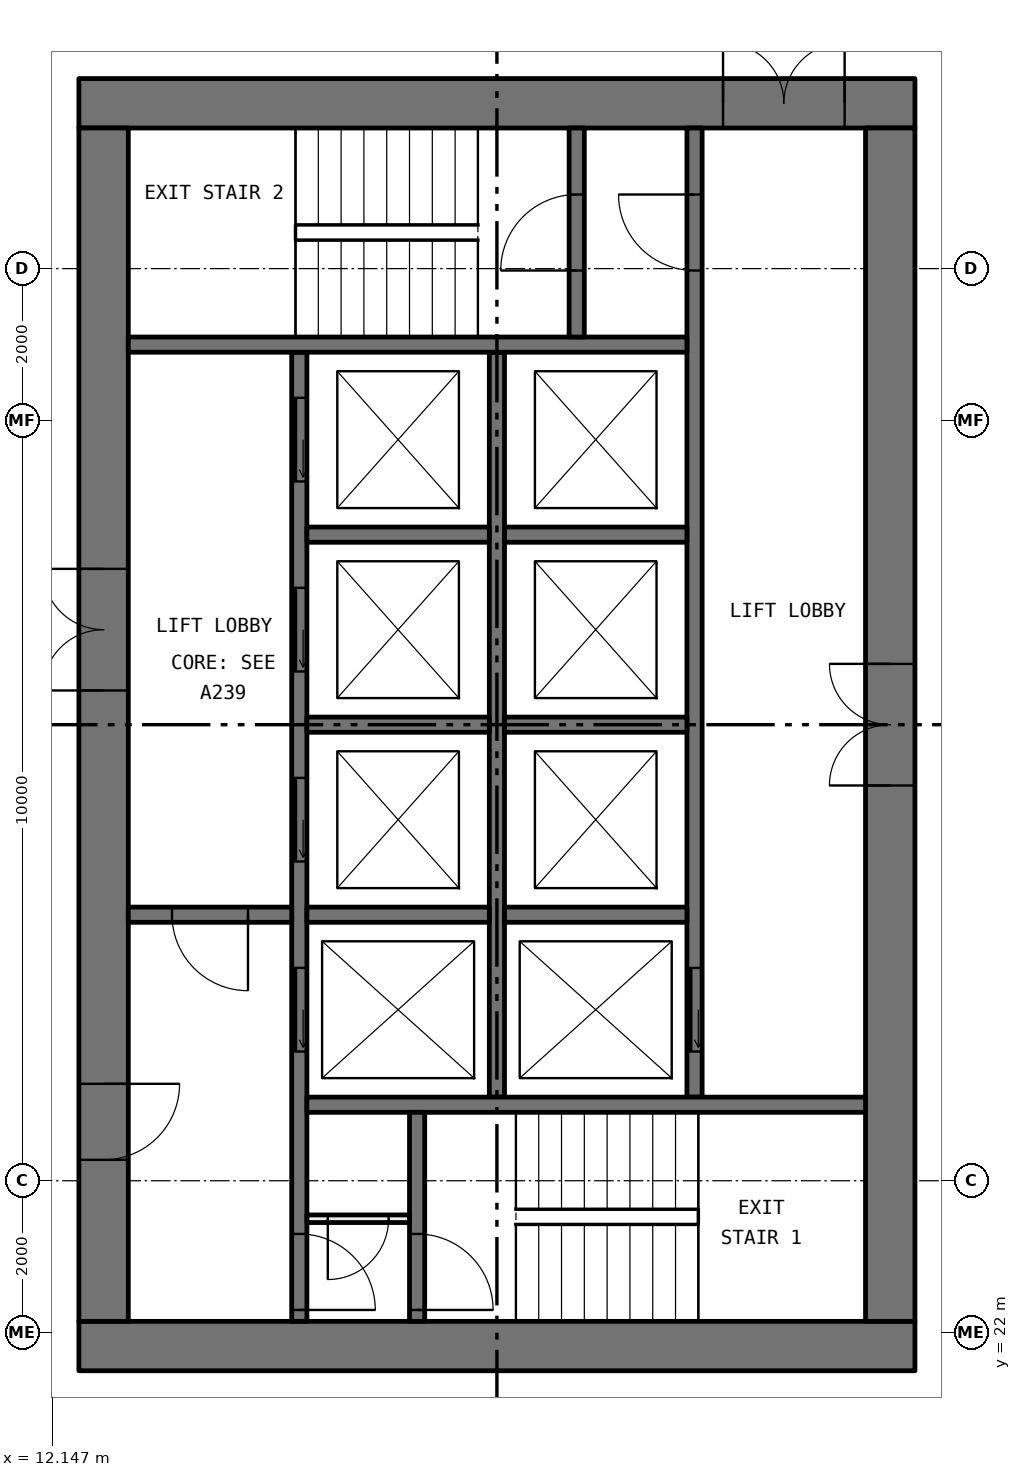
"""IFC4 building model, lengths in metres.
Left out: names, types, materials, properties, quantities, classifications, styles, units other than length and angle.
Written with IfcOpenShell. Run it as: python <this file> out.ifc"""

import sys

from ifc_helpers import new_model, si_unit, direction, frame, frame_2d, origin, place, context, subcontext, project, spatial, rectangle, extrude, element, fill, save


model = new_model("IFC4")
c1 = context("Model", 3, precision=1e-05, world=origin(), true_north=direction((0.0, 1.0)))
c2 = subcontext(c1, "Body", "Model", "MODEL_VIEW")
j1 = project(units=[si_unit("LENGTHUNIT", "METRE"), si_unit("PLANEANGLEUNIT", "RADIAN")], contexts=[c1])
p1 = place(None, origin())
s1 = spatial("IfcSite", under=j1, at=p1, CompositionType="ELEMENT")
p2 = place(p1, origin())
s2 = spatial("IfcBuilding", under=s1, at=p2, CompositionType="ELEMENT")
p3 = place(p2, frame((0.0, 0.0, 144.9)))
s3 = spatial("IfcBuildingStorey", under=s2, at=p3, CompositionType="ELEMENT", Elevation=144.9)
p4 = place(p3, frame((12.5, 21.825, 0.0), z_axis=(0.0, 0.0, 1.0), x_axis=(1.0, 0.0, 0.0)))
e1 = element("IfcWall", 1, at=p4, inside=s3, PredefinedType="SHEAR", context=c2, shape_type="SweptSolid", body=[
    extrude(rectangle(XDim=11.0, YDim=0.65, at=frame_2d((5.5, 0.0))), origin(), (0.0, 0.0, 1.0), 3.05),
])
p5 = place(p3, frame((12.5, 38.175, 0.0), z_axis=(0.0, 0.0, 1.0), x_axis=(1.0, 0.0, 0.0)))
e2 = element("IfcWall", 2, at=p5, inside=s3, PredefinedType="SHEAR", context=c2, shape_type="SweptSolid", body=[
    extrude(rectangle(XDim=11.0, YDim=0.65, at=frame_2d((5.5, 0.0))), origin(), (0.0, 0.0, 1.0), 3.05),
])
p6 = place(p5, frame((8.475, 0.0, 0.0)))
e3 = element("IfcOpeningElement", 3, at=p6, cuts=e2, PredefinedType="OPENING", context=c2, shape_type="SweptSolid", body=[
    extrude(rectangle(XDim=1.6, YDim=2.1, at=frame_2d((0.8, 1.05))), frame((0.0, 0.335, 0.0), z_axis=(0.0, -1.0, 0.0), x_axis=(1.0, 0.0, 0.0)), (0.0, 0.0, 1.0), 0.67),
])
p7 = place(p3, frame((12.825, 22.15, 0.0), z_axis=(0.0, 0.0, 1.0), x_axis=(0.0, 1.0, 0.0)))
e4 = element("IfcWall", 4, at=p7, inside=s3, PredefinedType="SHEAR", context=c2, shape_type="SweptSolid", body=[
    extrude(rectangle(XDim=15.7, YDim=0.65, at=frame_2d((7.85, 0.0))), origin(), (0.0, 0.0, 1.0), 3.05),
])
p8 = place(p7, frame((8.3, 0.0, 0.0)))
e5 = element("IfcOpeningElement", 5, at=p8, cuts=e4, PredefinedType="OPENING", context=c2, shape_type="SweptSolid", body=[
    extrude(rectangle(XDim=1.6, YDim=2.1, at=frame_2d((0.8, 1.05))), frame((0.0, 0.335, 0.0), z_axis=(0.0, -1.0, 0.0), x_axis=(1.0, 0.0, 0.0)), (0.0, 0.0, 1.0), 0.67),
])
p9 = place(p7, frame((2.125, 0.0, 0.0)))
e6 = element("IfcOpeningElement", 6, at=p9, cuts=e4, PredefinedType="OPENING", context=c2, shape_type="SweptSolid", body=[
    extrude(rectangle(XDim=1.0, YDim=2.1, at=frame_2d((0.5, 1.05))), frame((0.0, 0.335, 0.0), z_axis=(0.0, -1.0, 0.0), x_axis=(1.0, 0.0, 0.0)), (0.0, 0.0, 1.0), 0.67),
])
p10 = place(p3, frame((23.175, 22.15, 0.0), z_axis=(0.0, 0.0, 1.0), x_axis=(0.0, 1.0, 0.0)))
e7 = element("IfcWall", 7, at=p10, inside=s3, PredefinedType="SHEAR", context=c2, shape_type="SweptSolid", body=[
    extrude(rectangle(XDim=15.7, YDim=0.65, at=frame_2d((7.85, 0.0))), origin(), (0.0, 0.0, 1.0), 3.05),
])
p11 = place(p10, frame((7.05, 0.0, 0.0)))
e8 = element("IfcOpeningElement", 8, at=p11, cuts=e7, PredefinedType="OPENING", context=c2, shape_type="SweptSolid", body=[
    extrude(rectangle(XDim=1.6, YDim=2.1, at=frame_2d((0.8, 1.05))), frame((0.0, 0.335, 0.0), z_axis=(0.0, -1.0, 0.0), x_axis=(1.0, 0.0, 0.0)), (0.0, 0.0, 1.0), 0.67),
])
p12 = place(p3, frame((15.4, 22.15, 0.0), z_axis=(0.0, 0.0, 1.0), x_axis=(0.0, 1.0, 0.0)))
e9 = element("IfcWall", 9, at=p12, inside=s3, PredefinedType="SOLIDWALL", context=c2, shape_type="SweptSolid", body=[
    extrude(rectangle(XDim=12.75, YDim=0.2, at=frame_2d((6.375, 0.0))), origin(), (0.0, 0.0, 1.0), 3.05),
])
p13 = place(p12, frame((3.55, 0.0, 0.0)))
e10 = element("IfcOpeningElement", 10, at=p13, cuts=e9, PredefinedType="OPENING", context=c2, shape_type="SweptSolid", body=[
    extrude(rectangle(XDim=1.1, YDim=2.1, at=frame_2d((0.55, 1.05))), frame((0.0, 0.11, 0.0), z_axis=(0.0, -1.0, 0.0), x_axis=(1.0, 0.0, 0.0)), (0.0, 0.0, 1.0), 0.22),
])
p14 = place(p12, frame((6.05, 0.0, 0.0)))
e11 = element("IfcOpeningElement", 11, at=p14, cuts=e9, PredefinedType="OPENING", context=c2, shape_type="SweptSolid", body=[
    extrude(rectangle(XDim=1.1, YDim=2.1, at=frame_2d((0.55, 1.05))), frame((0.0, 0.11, 0.0), z_axis=(0.0, -1.0, 0.0), x_axis=(1.0, 0.0, 0.0)), (0.0, 0.0, 1.0), 0.22),
])
p15 = place(p12, frame((8.55, 0.0, 0.0)))
e12 = element("IfcOpeningElement", 12, at=p15, cuts=e9, PredefinedType="OPENING", context=c2, shape_type="SweptSolid", body=[
    extrude(rectangle(XDim=1.1, YDim=2.1, at=frame_2d((0.55, 1.05))), frame((0.0, 0.11, 0.0), z_axis=(0.0, -1.0, 0.0), x_axis=(1.0, 0.0, 0.0)), (0.0, 0.0, 1.0), 0.22),
])
p16 = place(p12, frame((11.05, 0.0, 0.0)))
e13 = element("IfcOpeningElement", 13, at=p16, cuts=e9, PredefinedType="OPENING", context=c2, shape_type="SweptSolid", body=[
    extrude(rectangle(XDim=1.1, YDim=2.1, at=frame_2d((0.55, 1.05))), frame((0.0, 0.11, 0.0), z_axis=(0.0, -1.0, 0.0), x_axis=(1.0, 0.0, 0.0)), (0.0, 0.0, 1.0), 0.22),
])
p17 = place(p12, frame((0.15, 0.0, 0.0)))
e14 = element("IfcOpeningElement", 14, at=p17, cuts=e9, PredefinedType="OPENING", context=c2, shape_type="SweptSolid", body=[
    extrude(rectangle(XDim=1.0, YDim=2.1, at=frame_2d((0.5, 1.05))), frame((0.0, 0.11, 0.0), z_axis=(0.0, -1.0, 0.0), x_axis=(1.0, 0.0, 0.0)), (0.0, 0.0, 1.0), 0.22),
])
p18 = place(p3, frame((20.6, 25.1, 0.0), z_axis=(0.0, 0.0, 1.0), x_axis=(0.0, 1.0, 0.0)))
e15 = element("IfcWall", 15, at=p18, inside=s3, PredefinedType="SOLIDWALL", context=c2, shape_type="SweptSolid", body=[
    extrude(rectangle(XDim=12.75, YDim=0.2, at=frame_2d((6.375, 0.0))), origin(), (0.0, 0.0, 1.0), 3.05),
])
p19 = place(p18, frame((0.6, 0.0, 0.0)))
e16 = element("IfcOpeningElement", 16, at=p19, cuts=e15, PredefinedType="OPENING", context=c2, shape_type="SweptSolid", body=[
    extrude(rectangle(XDim=1.1, YDim=2.1, at=frame_2d((0.55, 1.05))), frame((0.0, 0.11, 0.0), z_axis=(0.0, -1.0, 0.0), x_axis=(1.0, 0.0, 0.0)), (0.0, 0.0, 1.0), 0.22),
])
p20 = place(p18, frame((10.875, 0.0, 0.0)))
e17 = element("IfcOpeningElement", 17, at=p20, cuts=e15, PredefinedType="OPENING", context=c2, shape_type="SweptSolid", body=[
    extrude(rectangle(XDim=1.0, YDim=2.1, at=frame_2d((0.5, 1.05))), frame((0.0, 0.11, 0.0), z_axis=(0.0, -1.0, 0.0), x_axis=(1.0, 0.0, 0.0)), (0.0, 0.0, 1.0), 0.22),
])
p21 = place(p3, frame((18.0, 25.1, 0.0), z_axis=(0.0, 0.0, 1.0), x_axis=(0.0, 1.0, 0.0)))
e18 = element("IfcWall", 18, at=p21, inside=s3, PredefinedType="SOLIDWALL", context=c2, shape_type="SweptSolid", body=[
    extrude(rectangle(XDim=9.8, YDim=0.2, at=frame_2d((4.9, 0.0))), origin(), (0.0, 0.0, 1.0), 3.05),
])
for number, where, z_axis, x_axis in (
    (19, (15.5, 25.0, 0.0), (0.0, 0.0, 1.0), (1.0, 0.0, 0.0)),
    (20, (13.15, 35.0, 0.0), (0.0, 0.0, 1.0), (1.0, 0.0, 0.0)),
):
    element("IfcWall", number, at=place(p3, frame(where, z_axis=z_axis, x_axis=x_axis)), inside=s3, PredefinedType="SOLIDWALL", context=c2, shape_type="SweptSolid", body=[
        extrude(rectangle(XDim=7.35, YDim=0.2, at=frame_2d((3.675, 0.0))), origin(), (0.0, 0.0, 1.0), 3.05),
    ])
p22 = place(p3, frame((13.15, 27.5, 0.0), z_axis=(0.0, 0.0, 1.0), x_axis=(1.0, 0.0, 0.0)))
e21 = element("IfcWall", 21, at=p22, inside=s3, PredefinedType="SOLIDWALL", context=c2, shape_type="SweptSolid", body=[
    extrude(rectangle(XDim=2.15, YDim=0.2, at=frame_2d((1.075, 0.0))), origin(), (0.0, 0.0, 1.0), 3.05),
])
p23 = place(p22, frame((0.575, 0.0, 0.0)))
e22 = element("IfcOpeningElement", 22, at=p23, cuts=e21, PredefinedType="OPENING", context=c2, shape_type="SweptSolid", body=[
    extrude(rectangle(XDim=1.0, YDim=2.1, at=frame_2d((0.5, 1.05))), frame((0.0, 0.11, 0.0), z_axis=(0.0, -1.0, 0.0), x_axis=(1.0, 0.0, 0.0)), (0.0, 0.0, 1.0), 0.22),
])
p24 = place(p3, frame((16.95, 22.15, 0.0), z_axis=(0.0, 0.0, 1.0), x_axis=(0.0, 1.0, 0.0)))
e23 = element("IfcWall", 23, at=p24, inside=s3, PredefinedType="SOLIDWALL", context=c2, shape_type="SweptSolid", body=[
    extrude(rectangle(XDim=2.75, YDim=0.2, at=frame_2d((1.375, 0.0))), origin(), (0.0, 0.0, 1.0), 3.05),
])
p25 = place(p24, frame((0.15, 0.0, 0.0)))
e24 = element("IfcOpeningElement", 24, at=p25, cuts=e23, PredefinedType="OPENING", context=c2, shape_type="SweptSolid", body=[
    extrude(rectangle(XDim=1.0, YDim=2.1, at=frame_2d((0.5, 1.05))), frame((0.0, 0.11, 0.0), z_axis=(0.0, -1.0, 0.0), x_axis=(1.0, 0.0, 0.0)), (0.0, 0.0, 1.0), 0.22),
])
p26 = place(p3, frame((19.05, 35.1, 0.0), z_axis=(0.0, 0.0, 1.0), x_axis=(0.0, 1.0, 0.0)))
e25 = element("IfcWall", 25, at=p26, inside=s3, PredefinedType="SOLIDWALL", context=c2, shape_type="SweptSolid", body=[
    extrude(rectangle(XDim=2.75, YDim=0.2, at=frame_2d((1.375, 0.0))), origin(), (0.0, 0.0, 1.0), 3.05),
])
p27 = place(p26, frame((0.875, 0.0, 0.0)))
e26 = element("IfcOpeningElement", 26, at=p27, cuts=e25, PredefinedType="OPENING", context=c2, shape_type="SweptSolid", body=[
    extrude(rectangle(XDim=1.0, YDim=2.1, at=frame_2d((0.5, 1.05))), frame((0.0, 0.11, 0.0), z_axis=(0.0, -1.0, 0.0), x_axis=(1.0, 0.0, 0.0)), (0.0, 0.0, 1.0), 0.22),
])
for number, where, z_axis, x_axis in (
    (27, (15.5, 27.5, 0.0), (0.0, 0.0, 1.0), (1.0, 0.0, 0.0)),
    (28, (15.5, 30.0, 0.0), (0.0, 0.0, 1.0), (1.0, 0.0, 0.0)),
    (29, (15.5, 32.5, 0.0), (0.0, 0.0, 1.0), (1.0, 0.0, 0.0)),
    (30, (18.1, 27.5, 0.0), (0.0, 0.0, 1.0), (1.0, 0.0, 0.0)),
    (31, (18.1, 30.0, 0.0), (0.0, 0.0, 1.0), (1.0, 0.0, 0.0)),
    (32, (18.1, 32.5, 0.0), (0.0, 0.0, 1.0), (1.0, 0.0, 0.0)),
):
    element("IfcWall", number, at=place(p3, frame(where, z_axis=z_axis, x_axis=x_axis)), inside=s3, PredefinedType="SOLIDWALL", context=c2, shape_type="SweptSolid", body=[
        extrude(rectangle(XDim=2.4, YDim=0.2, at=frame_2d((1.2, 0.0))), origin(), (0.0, 0.0, 1.0), 3.05),
    ])
p28 = place(p3, frame((15.5, 23.5, 0.0), z_axis=(0.0, 0.0, 1.0), x_axis=(1.0, 0.0, 0.0)))
e33 = element("IfcWall", 33, at=p28, inside=s3, PredefinedType="PARTITIONING", context=c2, shape_type="SweptSolid", body=[
    extrude(rectangle(XDim=1.35, YDim=0.1, at=frame_2d((0.675, 0.0))), origin(), (0.0, 0.0, 1.0), 3.05),
])
p29 = place(p28, frame((0.275, 0.0, 0.0)))
e34 = element("IfcOpeningElement", 34, at=p29, cuts=e33, PredefinedType="OPENING", context=c2, shape_type="SweptSolid", body=[
    extrude(rectangle(XDim=0.8, YDim=2.1, at=frame_2d((0.4, 1.05))), frame((0.0, 0.06, 0.0), z_axis=(0.0, -1.0, 0.0), x_axis=(1.0, 0.0, 0.0)), (0.0, 0.0, 1.0), 0.12),
])
p30 = place(p19, origin())
e35 = element("IfcDoor", 35, at=p30, inside=s3, OperationType="SLIDING_TO_LEFT", PredefinedType="DOOR", context=c2, shape_type="SweptSolid", body=[
    extrude(rectangle(XDim=1.1, YDim=2.1, at=frame_2d((0.55, 1.05))), frame((0.0, 0.025, 0.0), z_axis=(0.0, -1.0, 0.0), x_axis=(1.0, 0.0, 0.0)), (0.0, 0.0, 1.0), 0.05),
])
fill(e16, e35)
p31 = place(p13, origin())
e36 = element("IfcDoor", 36, at=p31, inside=s3, OperationType="SLIDING_TO_LEFT", PredefinedType="DOOR", context=c2, shape_type="SweptSolid", body=[
    extrude(rectangle(XDim=1.1, YDim=2.1, at=frame_2d((0.55, 1.05))), frame((0.0, 0.025, 0.0), z_axis=(0.0, -1.0, 0.0), x_axis=(1.0, 0.0, 0.0)), (0.0, 0.0, 1.0), 0.05),
])
fill(e10, e36)
p32 = place(p14, origin())
e37 = element("IfcDoor", 37, at=p32, inside=s3, OperationType="SLIDING_TO_LEFT", PredefinedType="DOOR", context=c2, shape_type="SweptSolid", body=[
    extrude(rectangle(XDim=1.1, YDim=2.1, at=frame_2d((0.55, 1.05))), frame((0.0, 0.025, 0.0), z_axis=(0.0, -1.0, 0.0), x_axis=(1.0, 0.0, 0.0)), (0.0, 0.0, 1.0), 0.05),
])
fill(e11, e37)
p33 = place(p15, origin())
e38 = element("IfcDoor", 38, at=p33, inside=s3, OperationType="SLIDING_TO_LEFT", PredefinedType="DOOR", context=c2, shape_type="SweptSolid", body=[
    extrude(rectangle(XDim=1.1, YDim=2.1, at=frame_2d((0.55, 1.05))), frame((0.0, 0.025, 0.0), z_axis=(0.0, -1.0, 0.0), x_axis=(1.0, 0.0, 0.0)), (0.0, 0.0, 1.0), 0.05),
])
fill(e12, e38)
p34 = place(p16, origin())
e39 = element("IfcDoor", 39, at=p34, inside=s3, OperationType="SLIDING_TO_LEFT", PredefinedType="DOOR", context=c2, shape_type="SweptSolid", body=[
    extrude(rectangle(XDim=1.1, YDim=2.1, at=frame_2d((0.55, 1.05))), frame((0.0, 0.025, 0.0), z_axis=(0.0, -1.0, 0.0), x_axis=(1.0, 0.0, 0.0)), (0.0, 0.0, 1.0), 0.05),
])
fill(e13, e39)
p35 = place(p25, frame((1.0, 0.0, 0.0), x_axis=(-1.0, 0.0, 0.0)))
e40 = element("IfcDoor", 40, at=p35, inside=s3, OperationType="SINGLE_SWING_LEFT", PredefinedType="DOOR", context=c2, shape_type="SweptSolid", body=[
    extrude(rectangle(XDim=1.0, YDim=2.1, at=frame_2d((0.5, 1.05))), frame((0.0, 0.025, 0.0), z_axis=(0.0, -1.0, 0.0), x_axis=(1.0, 0.0, 0.0)), (0.0, 0.0, 1.0), 0.05),
])
fill(e24, e40)
p36 = place(p17, frame((1.0, 0.0, 0.0), x_axis=(-1.0, 0.0, 0.0)))
e41 = element("IfcDoor", 41, at=p36, inside=s3, OperationType="SINGLE_SWING_LEFT", PredefinedType="DOOR", context=c2, shape_type="SweptSolid", body=[
    extrude(rectangle(XDim=1.0, YDim=2.1, at=frame_2d((0.5, 1.05))), frame((0.0, 0.025, 0.0), z_axis=(0.0, -1.0, 0.0), x_axis=(1.0, 0.0, 0.0)), (0.0, 0.0, 1.0), 0.05),
])
fill(e14, e41)
p37 = place(p20, origin())
e42 = element("IfcDoor", 42, at=p37, inside=s3, OperationType="SINGLE_SWING_LEFT", PredefinedType="DOOR", context=c2, shape_type="SweptSolid", body=[
    extrude(rectangle(XDim=1.0, YDim=2.1, at=frame_2d((0.5, 1.05))), frame((0.0, 0.025, 0.0), z_axis=(0.0, -1.0, 0.0), x_axis=(1.0, 0.0, 0.0)), (0.0, 0.0, 1.0), 0.05),
])
fill(e17, e42)
p38 = place(p27, origin())
e43 = element("IfcDoor", 43, at=p38, inside=s3, OperationType="SINGLE_SWING_RIGHT", PredefinedType="DOOR", context=c2, shape_type="SweptSolid", body=[
    extrude(rectangle(XDim=1.0, YDim=2.1, at=frame_2d((0.5, 1.05))), frame((0.0, 0.025, 0.0), z_axis=(0.0, -1.0, 0.0), x_axis=(1.0, 0.0, 0.0)), (0.0, 0.0, 1.0), 0.05),
])
fill(e26, e43)
p39 = place(p23, frame((1.0, 0.0, 0.0), x_axis=(-1.0, 0.0, 0.0)))
e44 = element("IfcDoor", 44, at=p39, inside=s3, OperationType="SINGLE_SWING_RIGHT", PredefinedType="DOOR", context=c2, shape_type="SweptSolid", body=[
    extrude(rectangle(XDim=1.0, YDim=2.1, at=frame_2d((0.5, 1.05))), frame((0.0, 0.025, 0.0), z_axis=(0.0, -1.0, 0.0), x_axis=(1.0, 0.0, 0.0)), (0.0, 0.0, 1.0), 0.05),
])
fill(e22, e44)
p40 = place(p29, frame((0.8, 0.0, 0.0), x_axis=(-1.0, 0.0, 0.0)))
e45 = element("IfcDoor", 45, at=p40, inside=s3, OperationType="SINGLE_SWING_LEFT", PredefinedType="DOOR", context=c2, shape_type="SweptSolid", body=[
    extrude(rectangle(XDim=0.8, YDim=2.1, at=frame_2d((0.4, 1.05))), frame((0.0, 0.025, 0.0), z_axis=(0.0, -1.0, 0.0), x_axis=(1.0, 0.0, 0.0)), (0.0, 0.0, 1.0), 0.05),
])
fill(e34, e45)
p41 = place(p8, origin())
e46 = element("IfcDoor", 46, at=p41, inside=s3, OperationType="DOUBLE_DOOR_SINGLE_SWING", PredefinedType="DOOR", context=c2, shape_type="SweptSolid", body=[
    extrude(rectangle(XDim=1.6, YDim=2.1, at=frame_2d((0.8, 1.05))), frame((0.0, 0.025, 0.0), z_axis=(0.0, -1.0, 0.0), x_axis=(1.0, 0.0, 0.0)), (0.0, 0.0, 1.0), 0.05),
])
fill(e5, e46)
p42 = place(p9, frame((1.0, 0.0, 0.0), x_axis=(-1.0, 0.0, 0.0)))
e47 = element("IfcDoor", 47, at=p42, inside=s3, OperationType="SINGLE_SWING_RIGHT", PredefinedType="DOOR", context=c2, shape_type="SweptSolid", body=[
    extrude(rectangle(XDim=1.0, YDim=2.1, at=frame_2d((0.5, 1.05))), frame((0.0, 0.025, 0.0), z_axis=(0.0, -1.0, 0.0), x_axis=(1.0, 0.0, 0.0)), (0.0, 0.0, 1.0), 0.05),
])
fill(e6, e47)
p43 = place(p6, origin())
e48 = element("IfcDoor", 48, at=p43, inside=s3, OperationType="DOUBLE_DOOR_SINGLE_SWING", PredefinedType="DOOR", context=c2, shape_type="SweptSolid", body=[
    extrude(rectangle(XDim=1.6, YDim=2.1, at=frame_2d((0.8, 1.05))), frame((0.0, 0.025, 0.0), z_axis=(0.0, -1.0, 0.0), x_axis=(1.0, 0.0, 0.0)), (0.0, 0.0, 1.0), 0.05),
])
fill(e3, e48)
p44 = place(p11, origin())
e49 = element("IfcDoor", 49, at=p44, inside=s3, OperationType="DOUBLE_DOOR_SINGLE_SWING", PredefinedType="DOOR", context=c2, shape_type="SweptSolid", body=[
    extrude(rectangle(XDim=1.6, YDim=2.1, at=frame_2d((0.8, 1.05))), frame((0.0, 0.025, 0.0), z_axis=(0.0, -1.0, 0.0), x_axis=(1.0, 0.0, 0.0)), (0.0, 0.0, 1.0), 0.05),
])
fill(e8, e49)
save(model, sys.argv[1])
